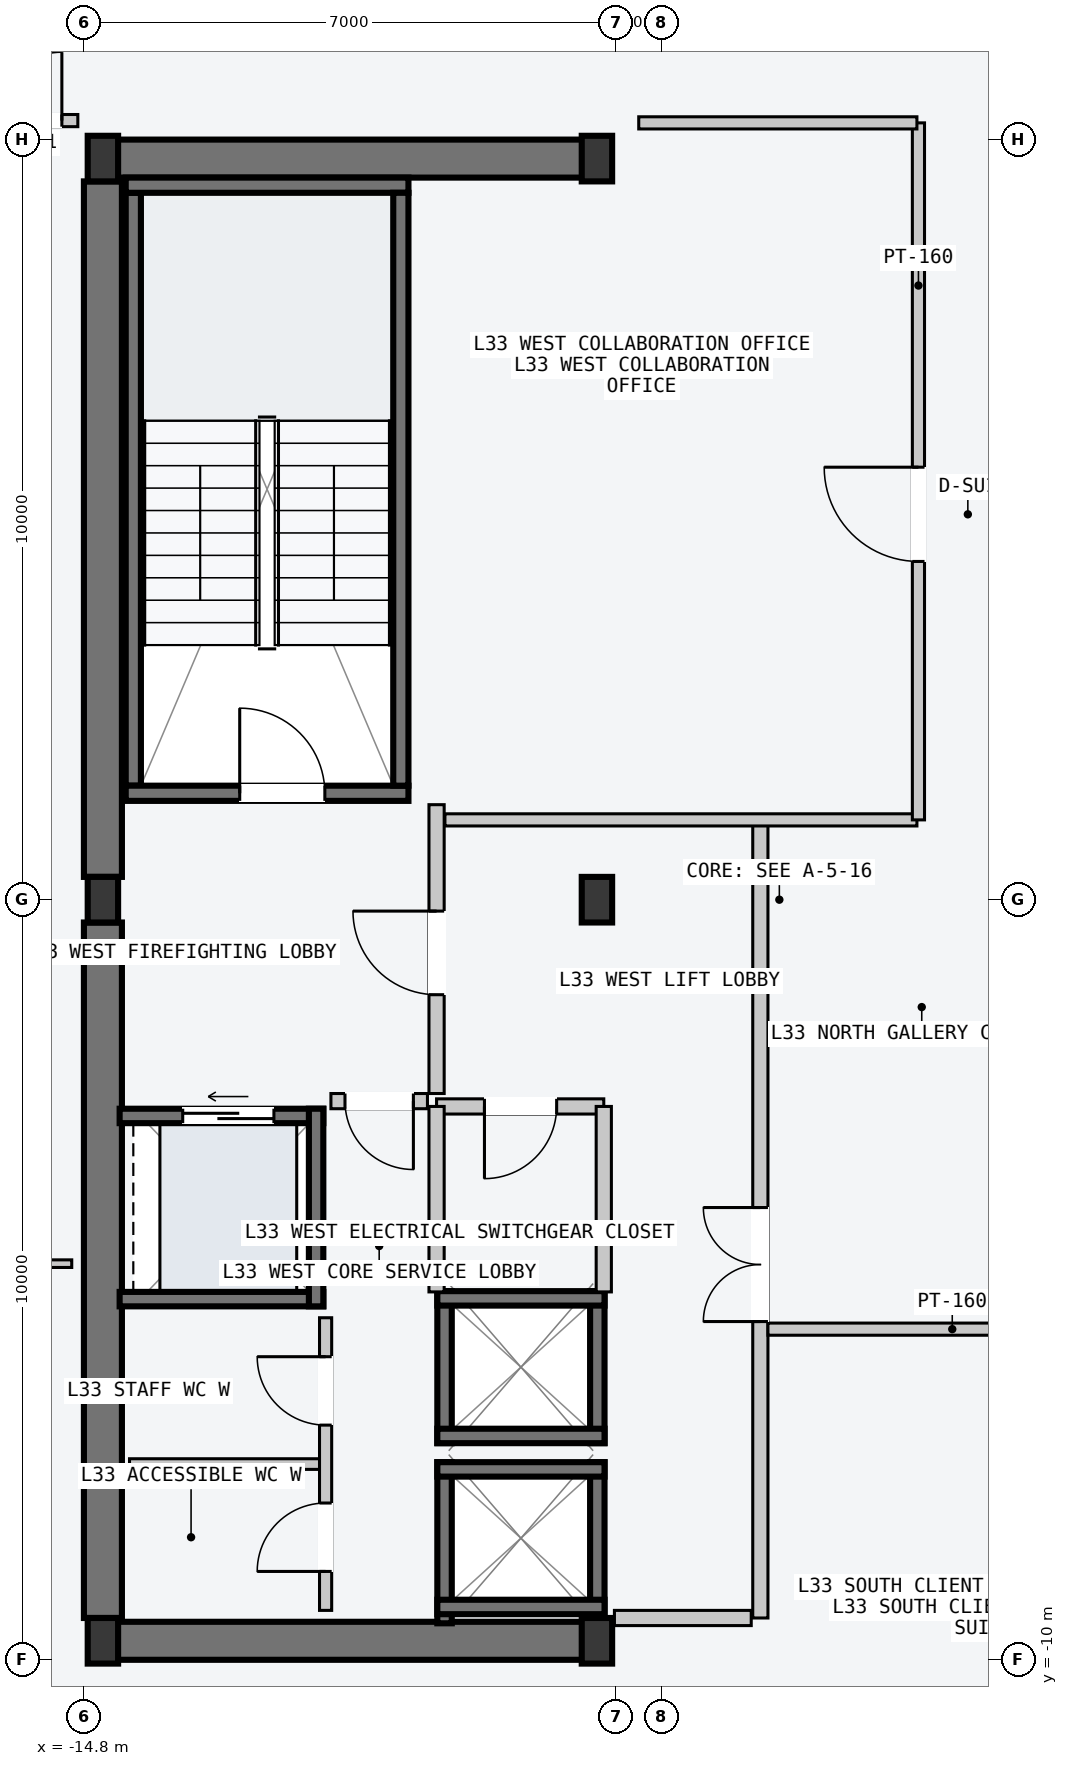
"""IFC4 building model, lengths in metres.
Left out: names, types, materials, properties, quantities, classifications, styles, units other than length and angle.
Written with IfcOpenShell. Run it as: python <this file> out.ifc"""

import sys

from ifc_helpers import new_model, si_unit, direction, frame, frame_2d, origin, origin_2d, place, context, subcontext, project, spatial, rectangle, i_section, extrude, element, fill, save


model = new_model("IFC4")
c1 = context("Model", 3, precision=1e-05, world=origin(), true_north=direction((0.0, 1.0)))
c2 = subcontext(c1, "Body", "Model", "MODEL_VIEW")
j1 = project(units=[si_unit("LENGTHUNIT", "METRE"), si_unit("PLANEANGLEUNIT", "RADIAN")], contexts=[c1])
p1 = place(None, origin())
s1 = spatial("IfcSite", under=j1, at=p1, CompositionType="ELEMENT")
p2 = place(p1, origin())
s2 = spatial("IfcBuilding", under=s1, at=p2, CompositionType="ELEMENT")
p3 = place(p2, frame((0.0, 0.0, 127.8)))
s3 = spatial("IfcBuildingStorey", under=s2, at=p3, CompositionType="ELEMENT", Elevation=127.8)
for number, where, z_axis, x_axis in (
    (1, (-14.53, -9.75, -0.2), (0.0, 0.0, 1.0), (1.0, 0.0, 0.0)),
    (2, (-14.53, 9.75, -0.2), (0.0, 0.0, 1.0), (1.0, 0.0, 0.0)),
):
    element("IfcWall", number, at=place(p3, frame(where, z_axis=z_axis, x_axis=x_axis)), inside=s3, PredefinedType="SHEAR", context=c2, shape_type="SweptSolid", body=[
        extrude(rectangle(XDim=6.46, YDim=0.5, at=frame_2d((3.23, 0.0))), origin(), (0.0, 0.0, 1.0), 3.6),
    ])
for number, where, z_axis, x_axis in (
    (3, (-14.55, -9.45, -0.2), (0.0, 0.0, 1.0), (0.0, 1.0, 0.0)),
    (4, (-14.55, 0.3, -0.2), (0.0, 0.0, 1.0), (0.0, 1.0, 0.0)),
):
    element("IfcWall", number, at=place(p3, frame(where, z_axis=z_axis, x_axis=x_axis)), inside=s3, PredefinedType="SHEAR", context=c2, shape_type="SweptSolid", body=[
        extrude(rectangle(XDim=9.15, YDim=0.5, at=frame_2d((4.575, 0.0))), origin(), (0.0, 0.0, 1.0), 3.6),
    ])
p4 = place(p3, frame((-14.15, 1.5, -0.2), z_axis=(0.0, 0.0, 1.0), x_axis=(0.0, 1.0, 0.0)))
e5 = element("IfcWall", 5, at=p4, inside=s3, PredefinedType="SOLIDWALL", context=c2, shape_type="SweptSolid", body=[
    extrude(rectangle(XDim=7.8, YDim=0.2, at=frame_2d((3.9, 0.0))), origin(), (0.0, 0.0, 1.0), 3.6),
])
p5 = place(p3, frame((-14.25, 1.4, -0.2), z_axis=(0.0, 0.0, 1.0), x_axis=(1.0, 0.0, 0.0)))
e6 = element("IfcWall", 6, at=p5, inside=s3, PredefinedType="SOLIDWALL", context=c2, shape_type="SweptSolid", body=[
    extrude(rectangle(XDim=3.72, YDim=0.2, at=frame_2d((1.86, 0.0))), origin(), (0.0, 0.0, 1.0), 3.6),
])
p6 = place(p5, frame((1.5, 0.0, 0.2)))
e7 = element("IfcOpeningElement", 7, at=p6, cuts=e6, PredefinedType="OPENING", context=c2, shape_type="SweptSolid", body=[
    extrude(rectangle(XDim=1.12, YDim=2.18, at=frame_2d((0.56, 1.09))), frame((0.0, 0.11, 0.0), z_axis=(0.0, -1.0, 0.0), x_axis=(1.0, 0.0, 0.0)), (0.0, 0.0, 1.0), 0.22),
])
p7 = place(p3, frame((-14.25, 9.4, -0.2), z_axis=(0.0, 0.0, 1.0), x_axis=(1.0, 0.0, 0.0)))
e8 = element("IfcWall", 8, at=p7, inside=s3, PredefinedType="SOLIDWALL", context=c2, shape_type="SweptSolid", body=[
    extrude(rectangle(XDim=3.72, YDim=0.2, at=frame_2d((1.86, 0.0))), origin(), (0.0, 0.0, 1.0), 3.6),
])
p8 = place(p3, frame((-10.63, 1.5, -0.2), z_axis=(0.0, 0.0, 1.0), x_axis=(0.0, 1.0, 0.0)))
e9 = element("IfcWall", 9, at=p8, inside=s3, PredefinedType="SOLIDWALL", context=c2, shape_type="SweptSolid", body=[
    extrude(rectangle(XDim=7.8, YDim=0.2, at=frame_2d((3.9, 0.0))), origin(), (0.0, 0.0, 1.0), 3.6),
])
for number, where, z_axis, x_axis in (
    (10, (-14.55, -9.75, 0.0), (0.0, 0.0, 1.0), (1.0, 0.0, 0.0)),
    (11, (-14.55, 0.0, 0.0), (0.0, 0.0, 1.0), (1.0, 0.0, 0.0)),
    (12, (-14.55, 9.75, 0.0), (0.0, 0.0, 1.0), (1.0, 0.0, 0.0)),
    (13, (-8.05, -9.75, 0.0), (0.0, 0.0, 1.0), (1.0, 0.0, 0.0)),
    (14, (-8.05, 0.0, 0.0), (0.0, 0.0, 1.0), (1.0, 0.0, 0.0)),
    (15, (-8.05, 9.75, 0.0), (0.0, 0.0, 1.0), (1.0, 0.0, 0.0)),
):
    element("IfcColumn", number, at=place(p3, frame(where, z_axis=z_axis, x_axis=x_axis)), inside=s3, PredefinedType="COLUMN", context=c2, shape_type="SweptSolid", body=[
        extrude(i_section(OverallWidth=0.4, OverallDepth=0.6, WebThickness=0.022, FlangeThickness=0.036, at=origin_2d()), origin(), (0.0, 0.0, 1.0), 3.6),
    ])
for number, where, z_axis, x_axis in (
    (16, (-8.045, -9.52, -0.2), (0.0, 0.0, 1.0), (0.0, 1.0, 0.0)),
    (17, (-10.055, -9.52, -0.2), (0.0, 0.0, 1.0), (0.0, 1.0, 0.0)),
):
    element("IfcWall", number, at=place(p3, frame(where, z_axis=z_axis, x_axis=x_axis)), inside=s3, PredefinedType="SOLIDWALL", context=c2, shape_type="SweptSolid", body=[
        extrude(rectangle(XDim=2.12, YDim=0.19, at=frame_2d((1.06, 0.0))), origin(), (0.0, 0.0, 1.0), 3.6),
    ])
for number, where, z_axis, x_axis in (
    (18, (-10.15, -7.495, -0.2), (0.0, 0.0, 1.0), (1.0, 0.0, 0.0)),
    (19, (-10.15, -9.305, -0.2), (0.0, 0.0, 1.0), (1.0, 0.0, 0.0)),
):
    element("IfcWall", number, at=place(p3, frame(where, z_axis=z_axis, x_axis=x_axis)), inside=s3, PredefinedType="SOLIDWALL", context=c2, shape_type="SweptSolid", body=[
        extrude(rectangle(XDim=2.2, YDim=0.19, at=frame_2d((1.1, 0.0))), origin(), (0.0, 0.0, 1.0), 3.6),
    ])
for number, where, z_axis, x_axis in (
    (20, (-8.045, -7.15, -0.2), (0.0, 0.0, 1.0), (0.0, 1.0, 0.0)),
    (21, (-10.055, -7.15, -0.2), (0.0, 0.0, 1.0), (0.0, 1.0, 0.0)),
):
    element("IfcWall", number, at=place(p3, frame(where, z_axis=z_axis, x_axis=x_axis)), inside=s3, PredefinedType="SOLIDWALL", context=c2, shape_type="SweptSolid", body=[
        extrude(rectangle(XDim=2.0, YDim=0.19, at=frame_2d((1.0, 0.0))), origin(), (0.0, 0.0, 1.0), 3.6),
    ])
for number, where, z_axis, x_axis in (
    (22, (-10.15, -5.245, -0.2), (0.0, 0.0, 1.0), (1.0, 0.0, 0.0)),
    (23, (-10.15, -7.055, -0.2), (0.0, 0.0, 1.0), (1.0, 0.0, 0.0)),
):
    element("IfcWall", number, at=place(p3, frame(where, z_axis=z_axis, x_axis=x_axis)), inside=s3, PredefinedType="SOLIDWALL", context=c2, shape_type="SweptSolid", body=[
        extrude(rectangle(XDim=2.2, YDim=0.19, at=frame_2d((1.1, 0.0))), origin(), (0.0, 0.0, 1.0), 3.6),
    ])
p9 = place(p3, frame((-14.33, -2.845, -0.2), z_axis=(0.0, 0.0, 1.0), x_axis=(1.0, 0.0, 0.0)))
e24 = element("IfcWall", 24, at=p9, inside=s3, PredefinedType="SOLIDWALL", context=c2, shape_type="SweptSolid", body=[
    extrude(rectangle(XDim=2.68, YDim=0.19, at=frame_2d((1.34, 0.0))), origin(), (0.0, 0.0, 1.0), 3.6),
])
p10 = place(p9, frame((0.83, 0.0, 0.2)))
e25 = element("IfcOpeningElement", 25, at=p10, cuts=e24, PredefinedType="OPENING", context=c2, shape_type="SweptSolid", body=[
    extrude(rectangle(XDim=1.2, YDim=2.2, at=frame_2d((0.6, 1.1))), frame((0.0, 0.105, 0.0), z_axis=(0.0, -1.0, 0.0), x_axis=(1.0, 0.0, 0.0)), (0.0, 0.0, 1.0), 0.21),
])
p11 = place(p3, frame((-14.33, -5.255, -0.2), z_axis=(0.0, 0.0, 1.0), x_axis=(1.0, 0.0, 0.0)))
e26 = element("IfcWall", 26, at=p11, inside=s3, PredefinedType="SOLIDWALL", context=c2, shape_type="SweptSolid", body=[
    extrude(rectangle(XDim=2.68, YDim=0.19, at=frame_2d((1.34, 0.0))), origin(), (0.0, 0.0, 1.0), 3.6),
])
p12 = place(p3, frame((-11.745, -5.35, -0.2), z_axis=(0.0, 0.0, 1.0), x_axis=(0.0, 1.0, 0.0)))
e27 = element("IfcWall", 27, at=p12, inside=s3, PredefinedType="SOLIDWALL", context=c2, shape_type="SweptSolid", body=[
    extrude(rectangle(XDim=2.6, YDim=0.19, at=frame_2d((1.3, 0.0))), origin(), (0.0, 0.0, 1.0), 3.6),
])
p13 = place(p3, frame((-5.9, -9.45, 0.0), z_axis=(0.0, 0.0, 1.0), x_axis=(0.0, 1.0, 0.0)))
e28 = element("IfcWall", 28, at=p13, inside=s3, PredefinedType="PARTITIONING", context=c2, shape_type="SweptSolid", body=[
    extrude(rectangle(XDim=10.5, YDim=0.2, at=frame_2d((5.25, 0.0))), origin(), (0.0, 0.0, 1.0), 3.4),
])
p14 = place(p13, frame((3.9, 0.0, 0.0)))
e29 = element("IfcOpeningElement", 29, at=p14, cuts=e28, PredefinedType="OPENING", context=c2, shape_type="SweptSolid", body=[
    extrude(rectangle(XDim=1.5, YDim=2.2, at=frame_2d((0.75, 1.1))), frame((0.0, 0.11, 0.0), z_axis=(0.0, -1.0, 0.0), x_axis=(1.0, 0.0, 0.0)), (0.0, 0.0, 1.0), 0.22),
])
p15 = place(p3, frame((-6.02, -9.45, 0.0), z_axis=(0.0, 0.0, 1.0), x_axis=(-1.0, 0.0, 0.0)))
e30 = element("IfcWall", 30, at=p15, inside=s3, PredefinedType="PARTITIONING", context=c2, shape_type="SweptSolid", body=[
    extrude(rectangle(XDim=1.8, YDim=0.2, at=frame_2d((0.9, 0.0))), origin(), (0.0, 0.0, 1.0), 3.4),
])
p16 = place(p3, frame((-10.16, -2.55, 0.0), z_axis=(0.0, 0.0, 1.0), x_axis=(0.0, 1.0, 0.0)))
e31 = element("IfcWall", 31, at=p16, inside=s3, PredefinedType="PARTITIONING", context=c2, shape_type="SweptSolid", body=[
    extrude(rectangle(XDim=3.8, YDim=0.2, at=frame_2d((1.9, 0.0))), origin(), (0.0, 0.0, 1.0), 3.4),
])
p17 = place(p16, frame((1.3, 0.0, 0.0)))
e32 = element("IfcOpeningElement", 32, at=p17, cuts=e31, PredefinedType="OPENING", context=c2, shape_type="SweptSolid", body=[
    extrude(rectangle(XDim=1.1, YDim=2.15, at=frame_2d((0.55, 1.075))), frame((0.0, 0.11, 0.0), z_axis=(0.0, -1.0, 0.0), x_axis=(1.0, 0.0, 0.0)), (0.0, 0.0, 1.0), 0.22),
])
p18 = place(p3, frame((-10.28, -2.65, 0.0), z_axis=(0.0, 0.0, 1.0), x_axis=(-1.0, 0.0, 0.0)))
e33 = element("IfcWall", 33, at=p18, inside=s3, PredefinedType="PARTITIONING", context=c2, shape_type="SweptSolid", body=[
    extrude(rectangle(XDim=1.27, YDim=0.2, at=frame_2d((0.635, 0.0))), origin(), (0.0, 0.0, 1.0), 3.4),
])
p19 = place(p18, frame((0.185, 0.0, 0.0)))
e34 = element("IfcOpeningElement", 34, at=p19, cuts=e33, PredefinedType="OPENING", context=c2, shape_type="SweptSolid", body=[
    extrude(rectangle(XDim=0.9, YDim=2.15, at=frame_2d((0.45, 1.075))), frame((0.0, 0.11, 0.0), z_axis=(0.0, -1.0, 0.0), x_axis=(1.0, 0.0, 0.0)), (0.0, 0.0, 1.0), 0.22),
])
p20 = place(p3, frame((-7.96, -2.72, 0.0), z_axis=(0.0, 0.0, 1.0), x_axis=(-1.0, 0.0, 0.0)))
e35 = element("IfcWall", 35, at=p20, inside=s3, PredefinedType="PARTITIONING", context=c2, shape_type="SweptSolid", body=[
    extrude(rectangle(XDim=2.2, YDim=0.2, at=frame_2d((1.1, 0.0))), origin(), (0.0, 0.0, 1.0), 3.4),
])
p21 = place(p20, frame((0.62, 0.0, 0.0)))
e36 = element("IfcOpeningElement", 36, at=p21, cuts=e35, PredefinedType="OPENING", context=c2, shape_type="SweptSolid", body=[
    extrude(rectangle(XDim=0.95, YDim=2.1, at=frame_2d((0.475, 1.05))), frame((0.0, 0.11, 0.0), z_axis=(0.0, -1.0, 0.0), x_axis=(1.0, 0.0, 0.0)), (0.0, 0.0, 1.0), 0.22),
])
for number, where, z_axis, x_axis in (
    (37, (-7.96, -5.16, 0.0), (0.0, 0.0, 1.0), (0.0, 1.0, 0.0)),
    (38, (-10.16, -5.16, 0.0), (0.0, 0.0, 1.0), (0.0, 1.0, 0.0)),
):
    element("IfcWall", number, at=place(p3, frame(where, z_axis=z_axis, x_axis=x_axis)), inside=s3, PredefinedType="PARTITIONING", context=c2, shape_type="SweptSolid", body=[
        extrude(rectangle(XDim=2.44, YDim=0.2, at=frame_2d((1.22, 0.0))), origin(), (0.0, 0.0, 1.0), 3.4),
    ])
p22 = place(p3, frame((-11.7, -7.425, 0.0), z_axis=(0.0, 0.0, 1.0), x_axis=(-1.0, 0.0, 0.0)))
e39 = element("IfcWall", 39, at=p22, inside=s3, PredefinedType="PARTITIONING", context=c2, shape_type="SweptSolid", body=[
    extrude(rectangle(XDim=2.5, YDim=0.14, at=frame_2d((1.25, 0.0))), origin(), (0.0, 0.0, 1.0), 3.4),
])
p23 = place(p3, frame((-11.62, -9.35, 0.0), z_axis=(0.0, 0.0, 1.0), x_axis=(0.0, 1.0, 0.0)))
e40 = element("IfcWall", 40, at=p23, inside=s3, PredefinedType="PARTITIONING", context=c2, shape_type="SweptSolid", body=[
    extrude(rectangle(XDim=3.85, YDim=0.16, at=frame_2d((1.925, 0.0))), origin(), (0.0, 0.0, 1.0), 3.4),
])
p24 = place(p23, frame((0.512, 0.0, 0.0)))
e41 = element("IfcOpeningElement", 41, at=p24, cuts=e40, PredefinedType="OPENING", context=c2, shape_type="SweptSolid", body=[
    extrude(rectangle(XDim=0.9, YDim=2.15, at=frame_2d((0.45, 1.075))), frame((0.0, 0.09, 0.0), z_axis=(0.0, -1.0, 0.0), x_axis=(1.0, 0.0, 0.0)), (0.0, 0.0, 1.0), 0.18),
])
p25 = place(p23, frame((2.438, 0.0, 0.0)))
e42 = element("IfcOpeningElement", 42, at=p25, cuts=e40, PredefinedType="OPENING", context=c2, shape_type="SweptSolid", body=[
    extrude(rectangle(XDim=0.9, YDim=2.15, at=frame_2d((0.45, 1.075))), frame((0.0, 0.09, 0.0), z_axis=(0.0, -1.0, 0.0), x_axis=(1.0, 0.0, 0.0)), (0.0, 0.0, 1.0), 0.18),
])
p26 = place(p3, frame((-10.05, 1.05, 0.0), z_axis=(0.0, 0.0, 1.0), x_axis=(1.0, 0.0, 0.0)))
e43 = element("IfcWall", 43, at=p26, inside=s3, PredefinedType="PARTITIONING", context=c2, shape_type="SweptSolid", body=[
    extrude(rectangle(XDim=6.21, YDim=0.16, at=frame_2d((3.105, 0.0))), origin(), (0.0, 0.0, 1.0), 3.4),
])
p27 = place(p3, frame((-3.82, 1.05, 0.0), z_axis=(0.0, 0.0, 1.0), x_axis=(0.0, 1.0, 0.0)))
e44 = element("IfcWall", 44, at=p27, inside=s3, PredefinedType="PARTITIONING", context=c2, shape_type="SweptSolid", body=[
    extrude(rectangle(XDim=9.17, YDim=0.16, at=frame_2d((4.585, 0.0))), origin(), (0.0, 0.0, 1.0), 3.4),
])
p28 = place(p27, frame((3.4, 0.0, 0.0)))
e45 = element("IfcOpeningElement", 45, at=p28, cuts=e44, PredefinedType="OPENING", context=c2, shape_type="SweptSolid", body=[
    extrude(rectangle(XDim=1.24, YDim=2.24, at=frame_2d((0.62, 1.12))), frame((0.0, 0.09, 0.0), z_axis=(0.0, -1.0, 0.0), x_axis=(1.0, 0.0, 0.0)), (0.0, 0.0, 1.0), 0.18),
])
p29 = place(p3, frame((-7.5, 10.22, 0.0), z_axis=(0.0, 0.0, 1.0), x_axis=(1.0, 0.0, 0.0)))
e46 = element("IfcWall", 46, at=p29, inside=s3, PredefinedType="PARTITIONING", context=c2, shape_type="SweptSolid", body=[
    extrude(rectangle(XDim=3.66, YDim=0.16, at=frame_2d((1.83, 0.0))), origin(), (0.0, 0.0, 1.0), 3.4),
])
p30 = place(p3, frame((-5.8, -5.65, 0.0), z_axis=(0.0, 0.0, 1.0), x_axis=(1.0, 0.0, 0.0)))
e47 = element("IfcWall", 47, at=p30, inside=s3, PredefinedType="PARTITIONING", context=c2, shape_type="SweptSolid", body=[
    extrude(rectangle(XDim=11.6, YDim=0.16, at=frame_2d((5.8, 0.0))), origin(), (0.0, 0.0, 1.0), 3.4),
])
p31 = place(p30, frame((5.1, 0.0, 0.0)))
e48 = element("IfcOpeningElement", 48, at=p31, cuts=e47, PredefinedType="OPENING", context=c2, shape_type="SweptSolid", body=[
    extrude(rectangle(XDim=1.4, YDim=2.2, at=frame_2d((0.7, 1.1))), frame((0.0, 0.09, 0.0), z_axis=(0.0, -1.0, 0.0), x_axis=(1.0, 0.0, 0.0)), (0.0, 0.0, 1.0), 0.18),
])
p32 = place(p3, frame((-16.2, 10.25, 0.0), z_axis=(0.0, 0.0, 1.0), x_axis=(1.0, 0.0, 0.0)))
e49 = element("IfcWall", 49, at=p32, inside=s3, PredefinedType="PARTITIONING", context=c2, shape_type="SweptSolid", body=[
    extrude(rectangle(XDim=1.32, YDim=0.16, at=frame_2d((0.66, 0.0))), origin(), (0.0, 0.0, 1.0), 3.4),
])
p33 = place(p32, frame((0.21, 0.0, 0.0)))
e50 = element("IfcOpeningElement", 50, at=p33, cuts=e49, PredefinedType="OPENING", context=c2, shape_type="SweptSolid", body=[
    extrude(rectangle(XDim=0.9, YDim=2.15, at=frame_2d((0.45, 1.075))), frame((0.0, 0.09, 0.0), z_axis=(0.0, -1.0, 0.0), x_axis=(1.0, 0.0, 0.0)), (0.0, 0.0, 1.0), 0.18),
])
p34 = place(p3, frame((-22.56, -4.788, 0.0), z_axis=(0.0, 0.0, 1.0), x_axis=(1.0, 0.0, 0.0)))
e51 = element("IfcWall", 51, at=p34, inside=s3, PredefinedType="PARTITIONING", context=c2, shape_type="SweptSolid", body=[
    extrude(rectangle(XDim=7.6, YDim=0.1, at=frame_2d((3.8, 0.0))), origin(), (0.0, 0.0, 1.0), 3.4),
])
p35 = place(p34, frame((0.9, 0.0, 0.0)))
e52 = element("IfcOpeningElement", 52, at=p35, cuts=e51, PredefinedType="OPENING", context=c2, shape_type="SweptSolid", body=[
    extrude(rectangle(XDim=0.96, YDim=2.18, at=frame_2d((0.48, 1.09))), frame((0.0, 0.06, 0.0), z_axis=(0.0, -1.0, 0.0), x_axis=(1.0, 0.0, 0.0)), (0.0, 0.0, 1.0), 0.12),
])
p36 = place(p6, origin())
e53 = element("IfcDoor", 53, at=p36, inside=s3, OperationType="SINGLE_SWING_LEFT", PredefinedType="DOOR", context=c2, shape_type="SweptSolid", body=[
    extrude(rectangle(XDim=1.12, YDim=2.18, at=frame_2d((0.56, 1.09))), frame((0.0, 0.025, 0.0), z_axis=(0.0, -1.0, 0.0), x_axis=(1.0, 0.0, 0.0)), (0.0, 0.0, 1.0), 0.05),
])
fill(e7, e53)
p37 = place(p10, origin())
e54 = element("IfcDoor", 54, at=p37, inside=s3, OperationType="SLIDING_TO_LEFT", PredefinedType="DOOR", context=c2, shape_type="SweptSolid", body=[
    extrude(rectangle(XDim=1.2, YDim=2.2, at=frame_2d((0.6, 1.1))), frame((0.0, 0.025, 0.0), z_axis=(0.0, -1.0, 0.0), x_axis=(1.0, 0.0, 0.0)), (0.0, 0.0, 1.0), 0.05),
])
fill(e25, e54)
p38 = place(p14, origin())
e55 = element("IfcDoor", 55, at=p38, inside=s3, OperationType="DOUBLE_DOOR_SINGLE_SWING", PredefinedType="DOOR", context=c2, shape_type="SweptSolid", body=[
    extrude(rectangle(XDim=1.5, YDim=2.2, at=frame_2d((0.75, 1.1))), frame((0.0, 0.025, 0.0), z_axis=(0.0, -1.0, 0.0), x_axis=(1.0, 0.0, 0.0)), (0.0, 0.0, 1.0), 0.05),
])
fill(e29, e55)
p39 = place(p17, origin())
e56 = element("IfcDoor", 56, at=p39, inside=s3, OperationType="SINGLE_SWING_RIGHT", PredefinedType="DOOR", context=c2, shape_type="SweptSolid", body=[
    extrude(rectangle(XDim=1.1, YDim=2.15, at=frame_2d((0.55, 1.075))), frame((0.0, 0.025, 0.0), z_axis=(0.0, -1.0, 0.0), x_axis=(1.0, 0.0, 0.0)), (0.0, 0.0, 1.0), 0.05),
])
fill(e32, e56)
p40 = place(p19, origin())
e57 = element("IfcDoor", 57, at=p40, inside=s3, OperationType="SINGLE_SWING_LEFT", PredefinedType="DOOR", context=c2, shape_type="SweptSolid", body=[
    extrude(rectangle(XDim=0.9, YDim=2.15, at=frame_2d((0.45, 1.075))), frame((0.0, 0.025, 0.0), z_axis=(0.0, -1.0, 0.0), x_axis=(1.0, 0.0, 0.0)), (0.0, 0.0, 1.0), 0.05),
])
fill(e34, e57)
p41 = place(p21, origin())
e58 = element("IfcDoor", 58, at=p41, inside=s3, OperationType="SINGLE_SWING_RIGHT", PredefinedType="DOOR", context=c2, shape_type="SweptSolid", body=[
    extrude(rectangle(XDim=0.95, YDim=2.1, at=frame_2d((0.475, 1.05))), frame((0.0, 0.025, 0.0), z_axis=(0.0, -1.0, 0.0), x_axis=(1.0, 0.0, 0.0)), (0.0, 0.0, 1.0), 0.05),
])
fill(e36, e58)
p42 = place(p24, origin())
e59 = element("IfcDoor", 59, at=p42, inside=s3, OperationType="SINGLE_SWING_LEFT", PredefinedType="DOOR", context=c2, shape_type="SweptSolid", body=[
    extrude(rectangle(XDim=0.9, YDim=2.15, at=frame_2d((0.45, 1.075))), frame((0.0, 0.025, 0.0), z_axis=(0.0, -1.0, 0.0), x_axis=(1.0, 0.0, 0.0)), (0.0, 0.0, 1.0), 0.05),
])
fill(e41, e59)
p43 = place(p25, origin())
e60 = element("IfcDoor", 60, at=p43, inside=s3, OperationType="SINGLE_SWING_RIGHT", PredefinedType="DOOR", context=c2, shape_type="SweptSolid", body=[
    extrude(rectangle(XDim=0.9, YDim=2.15, at=frame_2d((0.45, 1.075))), frame((0.0, 0.025, 0.0), z_axis=(0.0, -1.0, 0.0), x_axis=(1.0, 0.0, 0.0)), (0.0, 0.0, 1.0), 0.05),
])
fill(e42, e60)
p44 = place(p28, origin())
e61 = element("IfcDoor", 61, at=p44, inside=s3, OperationType="SINGLE_SWING_RIGHT", PredefinedType="DOOR", context=c2, shape_type="SweptSolid", body=[
    extrude(rectangle(XDim=1.24, YDim=2.24, at=frame_2d((0.62, 1.12))), frame((0.0, 0.025, 0.0), z_axis=(0.0, -1.0, 0.0), x_axis=(1.0, 0.0, 0.0)), (0.0, 0.0, 1.0), 0.05),
])
fill(e45, e61)
p45 = place(p33, origin())
e62 = element("IfcDoor", 62, at=p45, inside=s3, OperationType="SINGLE_SWING_RIGHT", PredefinedType="DOOR", context=c2, shape_type="SweptSolid", body=[
    extrude(rectangle(XDim=0.9, YDim=2.15, at=frame_2d((0.45, 1.075))), frame((0.0, 0.025, 0.0), z_axis=(0.0, -1.0, 0.0), x_axis=(1.0, 0.0, 0.0)), (0.0, 0.0, 1.0), 0.05),
])
fill(e50, e62)
save(model, sys.argv[1])
